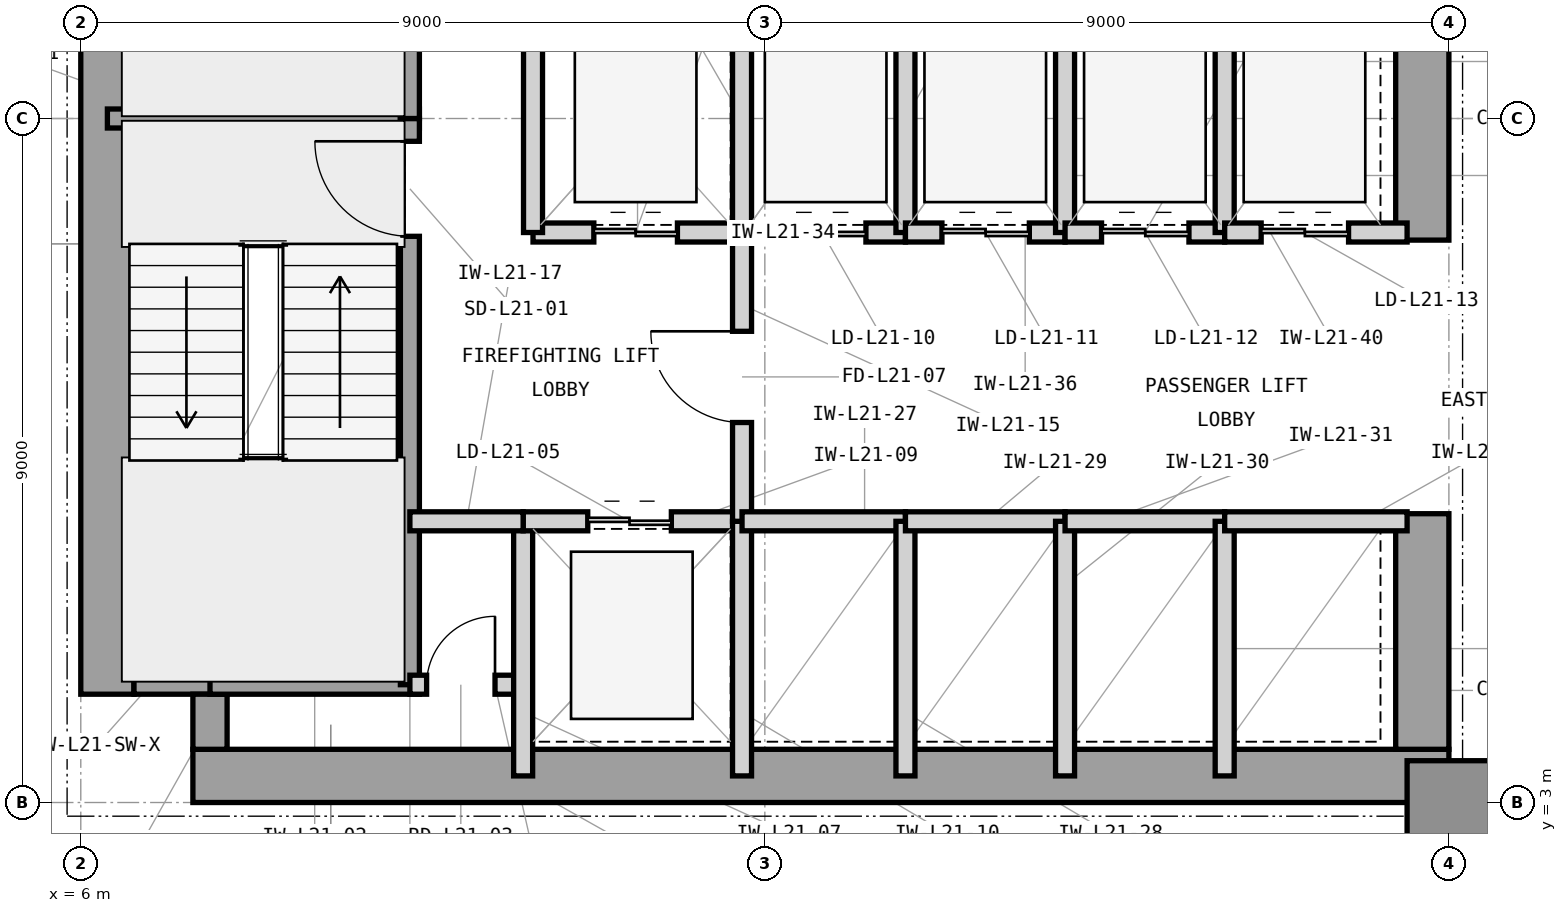
"""IFC4 building model, lengths in metres.
Left out: names, types, materials, properties, quantities, classifications, styles, units other than length and angle.
Written with IfcOpenShell. Run it as: python <this file> out.ifc"""

import sys

from ifc_helpers import new_model, si_unit, direction, frame, frame_2d, origin, origin_2d, place, context, subcontext, project, spatial, rectangle, extrude, element, fill, save


model = new_model("IFC4")
c1 = context("Model", 3, precision=1e-05, world=origin(), true_north=direction((0.0, 1.0)))
c2 = subcontext(c1, "Body", "Model", "MODEL_VIEW")
j1 = project(units=[si_unit("LENGTHUNIT", "METRE"), si_unit("PLANEANGLEUNIT", "RADIAN")], contexts=[c1])
p1 = place(None, origin())
s1 = spatial("IfcSite", under=j1, at=p1, CompositionType="ELEMENT")
p2 = place(p1, origin())
s2 = spatial("IfcBuilding", under=s1, at=p2, CompositionType="ELEMENT")
p3 = place(p2, frame((0.0, 0.0, 93.3)))
s3 = spatial("IfcBuildingStorey", under=s2, at=p3, CompositionType="ELEMENT", Elevation=93.3)
p4 = place(p3, frame((7.475, 3.35, 0.0), z_axis=(0.0, 0.0, 1.0), x_axis=(1.0, 0.0, 0.0)))
e1 = element("IfcWall", 1, at=p4, inside=s3, PredefinedType="SHEAR", context=c2, shape_type="SweptSolid", body=[
    extrude(rectangle(XDim=16.525, YDim=0.7, at=frame_2d((8.262, 0.0))), origin(), (0.0, 0.0, 1.0), 3.9),
])
p5 = place(p3, frame((6.35, 4.425, 0.0), z_axis=(0.0, 0.0, 1.0), x_axis=(0.0, 1.0, 0.0)))
e2 = element("IfcWall", 2, at=p5, inside=s3, PredefinedType="SHEAR", context=c2, shape_type="SweptSolid", body=[
    extrude(rectangle(XDim=15.15, YDim=0.7, at=frame_2d((7.575, 0.0))), origin(), (0.0, 0.0, 1.0), 3.9),
])
p6 = place(p3, frame((23.65, 3.7, 0.0), z_axis=(0.0, 0.0, 1.0), x_axis=(0.0, 1.0, 0.0)))
e3 = element("IfcWall", 3, at=p6, inside=s3, PredefinedType="SHEAR", context=c2, shape_type="SweptSolid", body=[
    extrude(rectangle(XDim=3.1, YDim=0.7, at=frame_2d((1.55, 0.0))), origin(), (0.0, 0.0, 1.0), 3.9),
])
p7 = place(p3, frame((23.65, 10.4, 0.0), z_axis=(0.0, 0.0, 1.0), x_axis=(0.0, 1.0, 0.0)))
e4 = element("IfcWall", 4, at=p7, inside=s3, PredefinedType="SHEAR", context=c2, shape_type="SweptSolid", body=[
    extrude(rectangle(XDim=3.2, YDim=0.7, at=frame_2d((1.6, 0.0))), origin(), (0.0, 0.0, 1.0), 3.9),
])
p8 = place(p3, frame((6.7, 4.65, 0.0), z_axis=(0.0, 0.0, 1.0), x_axis=(1.0, 0.0, 0.0)))
e5 = element("IfcWall", 5, at=p8, inside=s3, PredefinedType="SHEAR", context=c2, shape_type="SweptSolid", body=[
    extrude(rectangle(XDim=1.225, YDim=0.45, at=frame_2d((0.613, 0.0))), origin(), (0.0, 0.0, 1.0), 3.9),
])
p9 = place(p3, frame((7.7, 3.7, 0.0), z_axis=(0.0, 0.0, 1.0), x_axis=(0.0, 1.0, 0.0)))
e6 = element("IfcWall", 6, at=p9, inside=s3, PredefinedType="SHEAR", context=c2, shape_type="SweptSolid", body=[
    extrude(rectangle(XDim=0.725, YDim=0.45, at=frame_2d((0.363, 0.0))), origin(), (0.0, 0.0, 1.0), 3.9),
])
p10 = place(p3, frame((24.0, 3.0, 0.0), z_axis=(0.0, 0.0, 1.0), x_axis=(1.0, 0.0, 0.0)))
e7 = element("IfcColumn", 7, at=p10, inside=s3, PredefinedType="COLUMN", context=c2, shape_type="SweptSolid", body=[
    extrude(rectangle(XDim=1.1, YDim=1.1, at=origin_2d()), origin(), (0.0, 0.0, 1.0), 3.9),
])
p11 = place(p3, frame((23.9, 3.21, 0.0), z_axis=(0.0, 0.0, 1.0), x_axis=(1.0, 0.0, 0.0)))
e8 = element("IfcWall", 8, at=p11, inside=s3, PredefinedType="STANDARD", context=c2, shape_type="SweptSolid", body=[
    extrude(rectangle(XDim=37.5, YDim=0.42, at=frame_2d((18.75, 0.0))), origin(), (0.0, 0.0, 1.0), 3.7),
])
p12 = place(p11, frame((10.469, 0.0, 0.85)))
e9 = element("IfcOpeningElement", 9, at=p12, cuts=e8, PredefinedType="OPENING", context=c2, shape_type="SweptSolid", body=[
    extrude(rectangle(XDim=2.5, YDim=2.25, at=frame_2d((1.25, 1.125))), frame((0.0, 0.22, 0.0), z_axis=(0.0, -1.0, 0.0), x_axis=(1.0, 0.0, 0.0)), (0.0, 0.0, 1.0), 0.44),
])
p13 = place(p11, frame((19.844, 0.0, 0.85)))
e10 = element("IfcOpeningElement", 10, at=p13, cuts=e8, PredefinedType="OPENING", context=c2, shape_type="SweptSolid", body=[
    extrude(rectangle(XDim=2.5, YDim=2.25, at=frame_2d((1.25, 1.125))), frame((0.0, 0.22, 0.0), z_axis=(0.0, -1.0, 0.0), x_axis=(1.0, 0.0, 0.0)), (0.0, 0.0, 1.0), 0.44),
])
p14 = place(p3, frame((6.35, 12.0, 0.0), z_axis=(0.0, 0.0, 1.0), x_axis=(1.0, 0.0, 0.0)))
e11 = element("IfcWall", 11, at=p14, inside=s3, PredefinedType="SHEAR", context=c2, shape_type="SweptSolid", body=[
    extrude(rectangle(XDim=4.105, YDim=0.25, at=frame_2d((2.052, 0.0))), origin(), (0.0, 0.0, 1.0), 3.9),
])
p15 = place(p3, frame((7.7, 4.55, 0.0), z_axis=(0.0, 0.0, 1.0), x_axis=(1.0, 0.0, 0.0)))
e12 = element("IfcWall", 12, at=p15, inside=s3, PredefinedType="SHEAR", context=c2, shape_type="SweptSolid", body=[
    extrude(rectangle(XDim=2.755, YDim=0.25, at=frame_2d((1.377, 0.0))), origin(), (0.0, 0.0, 1.0), 3.9),
])
p16 = place(p3, frame((10.33, 4.55, 0.0), z_axis=(0.0, 0.0, 1.0), x_axis=(0.0, 1.0, 0.0)))
e13 = element("IfcWall", 13, at=p16, inside=s3, PredefinedType="SHEAR", context=c2, shape_type="SweptSolid", body=[
    extrude(rectangle(XDim=7.45, YDim=0.25, at=frame_2d((3.725, 0.0))), origin(), (0.0, 0.0, 1.0), 3.9),
])
p17 = place(p16, frame((5.9, 0.0, 0.0)))
e14 = element("IfcOpeningElement", 14, at=p17, cuts=e13, PredefinedType="OPENING", context=c2, shape_type="SweptSolid", body=[
    extrude(rectangle(XDim=1.25, YDim=2.2, at=frame_2d((0.625, 1.1))), frame((0.0, 0.135, 0.0), z_axis=(0.0, -1.0, 0.0), x_axis=(1.0, 0.0, 0.0)), (0.0, 0.0, 1.0), 0.27),
])
p18 = place(p3, frame((10.33, 12.0, 0.0), z_axis=(0.0, 0.0, 1.0), x_axis=(0.0, 1.0, 0.0)))
e15 = element("IfcWall", 15, at=p18, inside=s3, PredefinedType="SHEAR", context=c2, shape_type="SweptSolid", body=[
    extrude(rectangle(XDim=7.45, YDim=0.25, at=frame_2d((3.725, 0.0))), origin(), (0.0, 0.0, 1.0), 3.9),
])
p19 = place(p18, frame((5.85, 0.0, 0.0)))
e16 = element("IfcOpeningElement", 16, at=p19, cuts=e15, PredefinedType="OPENING", context=c2, shape_type="SweptSolid", body=[
    extrude(rectangle(XDim=1.25, YDim=2.2, at=frame_2d((0.625, 1.1))), frame((0.0, 0.135, 0.0), z_axis=(0.0, -1.0, 0.0), x_axis=(1.0, 0.0, 0.0)), (0.0, 0.0, 1.0), 0.27),
])
p20 = place(p3, frame((10.33, 4.55, 0.0), z_axis=(0.0, 0.0, 1.0), x_axis=(1.0, 0.0, 0.0)))
e17 = element("IfcWall", 17, at=p20, inside=s3, PredefinedType="PARTITIONING", context=c2, shape_type="SweptSolid", body=[
    extrude(rectangle(XDim=1.49, YDim=0.25, at=frame_2d((0.745, 0.0))), origin(), (0.0, 0.0, 1.0), 3.69),
])
p21 = place(p20, frame((0.22, 0.0, 0.0)))
e18 = element("IfcOpeningElement", 18, at=p21, cuts=e17, PredefinedType="OPENING", context=c2, shape_type="SweptSolid", body=[
    extrude(rectangle(XDim=0.9, YDim=2.1, at=frame_2d((0.45, 1.05))), frame((0.0, 0.135, 0.0), z_axis=(0.0, -1.0, 0.0), x_axis=(1.0, 0.0, 0.0)), (0.0, 0.0, 1.0), 0.27),
])
p22 = place(p3, frame((11.82, 3.35, 0.0), z_axis=(0.0, 0.0, 1.0), x_axis=(0.0, 1.0, 0.0)))
e19 = element("IfcWall", 19, at=p22, inside=s3, PredefinedType="PARTITIONING", context=c2, shape_type="SweptSolid", body=[
    extrude(rectangle(XDim=3.35, YDim=0.25, at=frame_2d((1.675, 0.0))), origin(), (0.0, 0.0, 1.0), 3.69),
])
p23 = place(p3, frame((11.82, 6.7, 0.0), z_axis=(0.0, 0.0, 1.0), x_axis=(1.0, 0.0, 0.0)))
e20 = element("IfcWall", 20, at=p23, inside=s3, PredefinedType="PARTITIONING", context=c2, shape_type="SweptSolid", body=[
    extrude(rectangle(XDim=2.88, YDim=0.25, at=frame_2d((1.44, 0.0))), origin(), (0.0, 0.0, 1.0), 3.227),
])
p24 = place(p23, frame((0.85, 0.0, 0.0)))
e21 = element("IfcOpeningElement", 21, at=p24, cuts=e20, PredefinedType="OPENING", context=c2, shape_type="SweptSolid", body=[
    extrude(rectangle(XDim=1.1, YDim=2.25, at=frame_2d((0.55, 1.125))), frame((0.0, 0.135, 0.0), z_axis=(0.0, -1.0, 0.0), x_axis=(1.0, 0.0, 0.0)), (0.0, 0.0, 1.0), 0.27),
])
p25 = place(p3, frame((14.7, 3.35, 0.0), z_axis=(0.0, 0.0, 1.0), x_axis=(0.0, 1.0, 0.0)))
e22 = element("IfcWall", 22, at=p25, inside=s3, PredefinedType="PARTITIONING", context=c2, shape_type="SweptSolid", body=[
    extrude(rectangle(XDim=3.35, YDim=0.25, at=frame_2d((1.675, 0.0))), origin(), (0.0, 0.0, 1.0), 3.69),
])
p26 = place(p3, frame((11.95, 10.5, 0.0), z_axis=(0.0, 0.0, 1.0), x_axis=(1.0, 0.0, 0.0)))
e23 = element("IfcWall", 23, at=p26, inside=s3, PredefinedType="PARTITIONING", context=c2, shape_type="SweptSolid", body=[
    extrude(rectangle(XDim=2.75, YDim=0.25, at=frame_2d((1.375, 0.0))), origin(), (0.0, 0.0, 1.0), 3.227),
])
p27 = place(p26, frame((0.8, 0.0, 0.0)))
e24 = element("IfcOpeningElement", 24, at=p27, cuts=e23, PredefinedType="OPENING", context=c2, shape_type="SweptSolid", body=[
    extrude(rectangle(XDim=1.1, YDim=2.25, at=frame_2d((0.55, 1.125))), frame((0.0, 0.135, 0.0), z_axis=(0.0, -1.0, 0.0), x_axis=(1.0, 0.0, 0.0)), (0.0, 0.0, 1.0), 0.27),
])
for number, where, z_axis, x_axis in (
    (25, (11.95, 10.5, 0.0), (0.0, 0.0, 1.0), (0.0, 1.0, 0.0)),
    (26, (14.7, 10.5, 0.0), (0.0, 0.0, 1.0), (0.0, 1.0, 0.0)),
):
    element("IfcWall", number, at=place(p3, frame(where, z_axis=z_axis, x_axis=x_axis)), inside=s3, PredefinedType="PARTITIONING", context=c2, shape_type="SweptSolid", body=[
        extrude(rectangle(XDim=3.0, YDim=0.25, at=frame_2d((1.5, 0.0))), origin(), (0.0, 0.0, 1.0), 3.69),
    ])
p28 = place(p3, frame((14.7, 6.7, 0.0), z_axis=(0.0, 0.0, 1.0), x_axis=(0.0, 1.0, 0.0)))
e27 = element("IfcWall", 27, at=p28, inside=s3, PredefinedType="PARTITIONING", context=c2, shape_type="SweptSolid", body=[
    extrude(rectangle(XDim=3.8, YDim=0.25, at=frame_2d((1.9, 0.0))), origin(), (0.0, 0.0, 1.0), 3.69),
])
p29 = place(p28, frame((1.3, 0.0, 0.0)))
e28 = element("IfcOpeningElement", 28, at=p29, cuts=e27, PredefinedType="OPENING", context=c2, shape_type="SweptSolid", body=[
    extrude(rectangle(XDim=1.2, YDim=2.2, at=frame_2d((0.6, 1.1))), frame((0.0, 0.135, 0.0), z_axis=(0.0, -1.0, 0.0), x_axis=(1.0, 0.0, 0.0)), (0.0, 0.0, 1.0), 0.27),
])
p30 = place(p3, frame((10.33, 6.7, 0.0), z_axis=(0.0, 0.0, 1.0), x_axis=(1.0, 0.0, 0.0)))
e29 = element("IfcWall", 29, at=p30, inside=s3, PredefinedType="PARTITIONING", context=c2, shape_type="SweptSolid", body=[
    extrude(rectangle(XDim=1.49, YDim=0.25, at=frame_2d((0.745, 0.0))), origin(), (0.0, 0.0, 1.0), 3.227),
])
p31 = place(p3, frame((14.7, 6.7, 0.0), z_axis=(0.0, 0.0, 1.0), x_axis=(1.0, 0.0, 0.0)))
e30 = element("IfcWall", 30, at=p31, inside=s3, PredefinedType="PARTITIONING", context=c2, shape_type="SweptSolid", body=[
    extrude(rectangle(XDim=2.15, YDim=0.25, at=frame_2d((1.075, 0.0))), origin(), (0.0, 0.0, 1.0), 3.227),
])
p32 = place(p3, frame((16.85, 3.35, 0.0), z_axis=(0.0, 0.0, 1.0), x_axis=(0.0, 1.0, 0.0)))
e31 = element("IfcWall", 31, at=p32, inside=s3, PredefinedType="PARTITIONING", context=c2, shape_type="SweptSolid", body=[
    extrude(rectangle(XDim=3.35, YDim=0.25, at=frame_2d((1.675, 0.0))), origin(), (0.0, 0.0, 1.0), 3.69),
])
p33 = place(p3, frame((16.85, 6.7, 0.0), z_axis=(0.0, 0.0, 1.0), x_axis=(1.0, 0.0, 0.0)))
e32 = element("IfcWall", 32, at=p33, inside=s3, PredefinedType="PARTITIONING", context=c2, shape_type="SweptSolid", body=[
    extrude(rectangle(XDim=2.1, YDim=0.25, at=frame_2d((1.05, 0.0))), origin(), (0.0, 0.0, 1.0), 3.227),
])
p34 = place(p3, frame((18.95, 3.35, 0.0), z_axis=(0.0, 0.0, 1.0), x_axis=(0.0, 1.0, 0.0)))
e33 = element("IfcWall", 33, at=p34, inside=s3, PredefinedType="PARTITIONING", context=c2, shape_type="SweptSolid", body=[
    extrude(rectangle(XDim=3.35, YDim=0.25, at=frame_2d((1.675, 0.0))), origin(), (0.0, 0.0, 1.0), 3.69),
])
p35 = place(p3, frame((18.95, 6.7, 0.0), z_axis=(0.0, 0.0, 1.0), x_axis=(1.0, 0.0, 0.0)))
e34 = element("IfcWall", 34, at=p35, inside=s3, PredefinedType="PARTITIONING", context=c2, shape_type="SweptSolid", body=[
    extrude(rectangle(XDim=2.1, YDim=0.25, at=frame_2d((1.05, 0.0))), origin(), (0.0, 0.0, 1.0), 3.227),
])
p36 = place(p3, frame((21.05, 3.35, 0.0), z_axis=(0.0, 0.0, 1.0), x_axis=(0.0, 1.0, 0.0)))
e35 = element("IfcWall", 35, at=p36, inside=s3, PredefinedType="PARTITIONING", context=c2, shape_type="SweptSolid", body=[
    extrude(rectangle(XDim=3.35, YDim=0.25, at=frame_2d((1.675, 0.0))), origin(), (0.0, 0.0, 1.0), 3.69),
])
p37 = place(p3, frame((21.05, 6.7, 0.0), z_axis=(0.0, 0.0, 1.0), x_axis=(1.0, 0.0, 0.0)))
e36 = element("IfcWall", 36, at=p37, inside=s3, PredefinedType="PARTITIONING", context=c2, shape_type="SweptSolid", body=[
    extrude(rectangle(XDim=2.4, YDim=0.25, at=frame_2d((1.2, 0.0))), origin(), (0.0, 0.0, 1.0), 3.227),
])
p38 = place(p3, frame((14.7, 10.5, 0.0), z_axis=(0.0, 0.0, 1.0), x_axis=(1.0, 0.0, 0.0)))
e37 = element("IfcWall", 37, at=p38, inside=s3, PredefinedType="PARTITIONING", context=c2, shape_type="SweptSolid", body=[
    extrude(rectangle(XDim=2.15, YDim=0.25, at=frame_2d((1.075, 0.0))), origin(), (0.0, 0.0, 1.0), 3.227),
])
p39 = place(p38, frame((0.48, 0.0, 0.0)))
e38 = element("IfcOpeningElement", 38, at=p39, cuts=e37, PredefinedType="OPENING", context=c2, shape_type="SweptSolid", body=[
    extrude(rectangle(XDim=1.15, YDim=2.25, at=frame_2d((0.575, 1.125))), frame((0.0, 0.135, 0.0), z_axis=(0.0, -1.0, 0.0), x_axis=(1.0, 0.0, 0.0)), (0.0, 0.0, 1.0), 0.27),
])
p40 = place(p3, frame((16.85, 10.5, 0.0), z_axis=(0.0, 0.0, 1.0), x_axis=(0.0, 1.0, 0.0)))
e39 = element("IfcWall", 39, at=p40, inside=s3, PredefinedType="PARTITIONING", context=c2, shape_type="SweptSolid", body=[
    extrude(rectangle(XDim=3.0, YDim=0.25, at=frame_2d((1.5, 0.0))), origin(), (0.0, 0.0, 1.0), 3.69),
])
p41 = place(p3, frame((16.85, 10.5, 0.0), z_axis=(0.0, 0.0, 1.0), x_axis=(1.0, 0.0, 0.0)))
e40 = element("IfcWall", 40, at=p41, inside=s3, PredefinedType="PARTITIONING", context=c2, shape_type="SweptSolid", body=[
    extrude(rectangle(XDim=2.1, YDim=0.25, at=frame_2d((1.05, 0.0))), origin(), (0.0, 0.0, 1.0), 3.227),
])
p42 = place(p41, frame((0.48, 0.0, 0.0)))
e41 = element("IfcOpeningElement", 41, at=p42, cuts=e40, PredefinedType="OPENING", context=c2, shape_type="SweptSolid", body=[
    extrude(rectangle(XDim=1.15, YDim=2.25, at=frame_2d((0.575, 1.125))), frame((0.0, 0.135, 0.0), z_axis=(0.0, -1.0, 0.0), x_axis=(1.0, 0.0, 0.0)), (0.0, 0.0, 1.0), 0.27),
])
p43 = place(p3, frame((18.95, 10.5, 0.0), z_axis=(0.0, 0.0, 1.0), x_axis=(0.0, 1.0, 0.0)))
e42 = element("IfcWall", 42, at=p43, inside=s3, PredefinedType="PARTITIONING", context=c2, shape_type="SweptSolid", body=[
    extrude(rectangle(XDim=3.0, YDim=0.25, at=frame_2d((1.5, 0.0))), origin(), (0.0, 0.0, 1.0), 3.69),
])
p44 = place(p3, frame((18.95, 10.5, 0.0), z_axis=(0.0, 0.0, 1.0), x_axis=(1.0, 0.0, 0.0)))
e43 = element("IfcWall", 43, at=p44, inside=s3, PredefinedType="PARTITIONING", context=c2, shape_type="SweptSolid", body=[
    extrude(rectangle(XDim=2.1, YDim=0.25, at=frame_2d((1.05, 0.0))), origin(), (0.0, 0.0, 1.0), 3.227),
])
p45 = place(p44, frame((0.48, 0.0, 0.0)))
e44 = element("IfcOpeningElement", 44, at=p45, cuts=e43, PredefinedType="OPENING", context=c2, shape_type="SweptSolid", body=[
    extrude(rectangle(XDim=1.15, YDim=2.25, at=frame_2d((0.575, 1.125))), frame((0.0, 0.135, 0.0), z_axis=(0.0, -1.0, 0.0), x_axis=(1.0, 0.0, 0.0)), (0.0, 0.0, 1.0), 0.27),
])
p46 = place(p3, frame((21.05, 10.5, 0.0), z_axis=(0.0, 0.0, 1.0), x_axis=(0.0, 1.0, 0.0)))
e45 = element("IfcWall", 45, at=p46, inside=s3, PredefinedType="PARTITIONING", context=c2, shape_type="SweptSolid", body=[
    extrude(rectangle(XDim=3.0, YDim=0.25, at=frame_2d((1.5, 0.0))), origin(), (0.0, 0.0, 1.0), 3.69),
])
p47 = place(p3, frame((21.05, 10.5, 0.0), z_axis=(0.0, 0.0, 1.0), x_axis=(1.0, 0.0, 0.0)))
e46 = element("IfcWall", 46, at=p47, inside=s3, PredefinedType="PARTITIONING", context=c2, shape_type="SweptSolid", body=[
    extrude(rectangle(XDim=2.4, YDim=0.25, at=frame_2d((1.2, 0.0))), origin(), (0.0, 0.0, 1.0), 3.227),
])
p48 = place(p47, frame((0.48, 0.0, 0.0)))
e47 = element("IfcOpeningElement", 47, at=p48, cuts=e46, PredefinedType="OPENING", context=c2, shape_type="SweptSolid", body=[
    extrude(rectangle(XDim=1.15, YDim=2.25, at=frame_2d((0.575, 1.125))), frame((0.0, 0.135, 0.0), z_axis=(0.0, -1.0, 0.0), x_axis=(1.0, 0.0, 0.0)), (0.0, 0.0, 1.0), 0.27),
])
p49 = place(p17, origin())
e48 = element("IfcDoor", 48, at=p49, inside=s3, OperationType="SINGLE_SWING_RIGHT", PredefinedType="DOOR", context=c2, shape_type="SweptSolid", body=[
    extrude(rectangle(XDim=1.25, YDim=2.2, at=frame_2d((0.625, 1.1))), frame((0.0, 0.025, 0.0), z_axis=(0.0, -1.0, 0.0), x_axis=(1.0, 0.0, 0.0)), (0.0, 0.0, 1.0), 0.05),
])
fill(e14, e48)
p50 = place(p21, origin())
e49 = element("IfcDoor", 49, at=p50, inside=s3, OperationType="SINGLE_SWING_RIGHT", PredefinedType="TRAPDOOR", context=c2, shape_type="SweptSolid", body=[
    extrude(rectangle(XDim=0.9, YDim=2.1, at=frame_2d((0.45, 1.05))), frame((0.0, 0.025, 0.0), z_axis=(0.0, -1.0, 0.0), x_axis=(1.0, 0.0, 0.0)), (0.0, 0.0, 1.0), 0.05),
])
fill(e18, e49)
p51 = place(p24, origin())
e50 = element("IfcDoor", 50, at=p51, inside=s3, OperationType="DOUBLE_DOOR_SLIDING", PredefinedType="DOOR", context=c2, shape_type="SweptSolid", body=[
    extrude(rectangle(XDim=1.1, YDim=2.25, at=frame_2d((0.55, 1.125))), frame((0.0, 0.025, 0.0), z_axis=(0.0, -1.0, 0.0), x_axis=(1.0, 0.0, 0.0)), (0.0, 0.0, 1.0), 0.05),
])
fill(e21, e50)
p52 = place(p27, origin())
e51 = element("IfcDoor", 51, at=p52, inside=s3, OperationType="DOUBLE_DOOR_SLIDING", PredefinedType="DOOR", context=c2, shape_type="SweptSolid", body=[
    extrude(rectangle(XDim=1.1, YDim=2.25, at=frame_2d((0.55, 1.125))), frame((0.0, 0.025, 0.0), z_axis=(0.0, -1.0, 0.0), x_axis=(1.0, 0.0, 0.0)), (0.0, 0.0, 1.0), 0.05),
])
fill(e24, e51)
p53 = place(p29, origin())
e52 = element("IfcDoor", 52, at=p53, inside=s3, OperationType="SINGLE_SWING_RIGHT", PredefinedType="DOOR", context=c2, shape_type="SweptSolid", body=[
    extrude(rectangle(XDim=1.2, YDim=2.2, at=frame_2d((0.6, 1.1))), frame((0.0, 0.025, 0.0), z_axis=(0.0, -1.0, 0.0), x_axis=(1.0, 0.0, 0.0)), (0.0, 0.0, 1.0), 0.05),
])
fill(e28, e52)
p54 = place(p39, origin())
e53 = element("IfcDoor", 53, at=p54, inside=s3, OperationType="DOUBLE_DOOR_SLIDING", PredefinedType="DOOR", context=c2, shape_type="SweptSolid", body=[
    extrude(rectangle(XDim=1.15, YDim=2.25, at=frame_2d((0.575, 1.125))), frame((0.0, 0.025, 0.0), z_axis=(0.0, -1.0, 0.0), x_axis=(1.0, 0.0, 0.0)), (0.0, 0.0, 1.0), 0.05),
])
fill(e38, e53)
p55 = place(p42, origin())
e54 = element("IfcDoor", 54, at=p55, inside=s3, OperationType="DOUBLE_DOOR_SLIDING", PredefinedType="DOOR", context=c2, shape_type="SweptSolid", body=[
    extrude(rectangle(XDim=1.15, YDim=2.25, at=frame_2d((0.575, 1.125))), frame((0.0, 0.025, 0.0), z_axis=(0.0, -1.0, 0.0), x_axis=(1.0, 0.0, 0.0)), (0.0, 0.0, 1.0), 0.05),
])
fill(e41, e54)
p56 = place(p45, origin())
e55 = element("IfcDoor", 55, at=p56, inside=s3, OperationType="DOUBLE_DOOR_SLIDING", PredefinedType="DOOR", context=c2, shape_type="SweptSolid", body=[
    extrude(rectangle(XDim=1.15, YDim=2.25, at=frame_2d((0.575, 1.125))), frame((0.0, 0.025, 0.0), z_axis=(0.0, -1.0, 0.0), x_axis=(1.0, 0.0, 0.0)), (0.0, 0.0, 1.0), 0.05),
])
fill(e44, e55)
p57 = place(p48, origin())
e56 = element("IfcDoor", 56, at=p57, inside=s3, OperationType="DOUBLE_DOOR_SLIDING", PredefinedType="DOOR", context=c2, shape_type="SweptSolid", body=[
    extrude(rectangle(XDim=1.15, YDim=2.25, at=frame_2d((0.575, 1.125))), frame((0.0, 0.025, 0.0), z_axis=(0.0, -1.0, 0.0), x_axis=(1.0, 0.0, 0.0)), (0.0, 0.0, 1.0), 0.05),
])
fill(e47, e56)
save(model, sys.argv[1])
